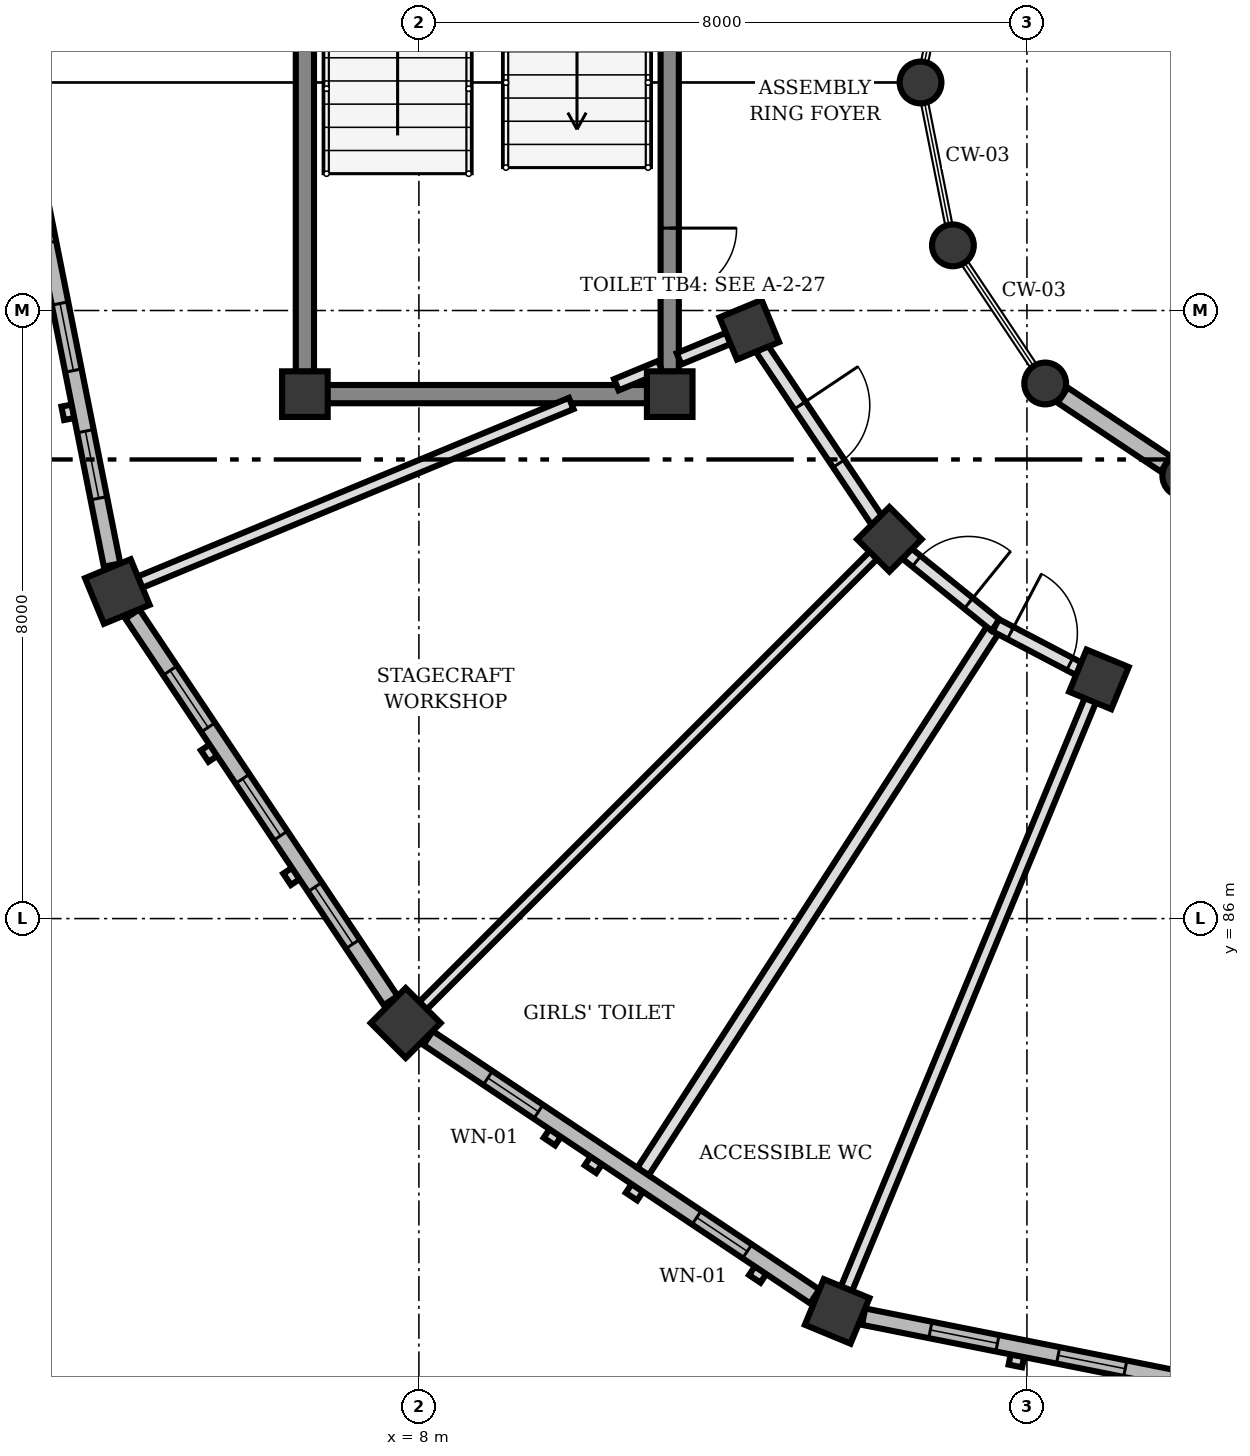
"""IFC4 building model, lengths in metres.
Left out: names, types, materials, properties, quantities, classifications, styles, units other than length and angle.
Written with IfcOpenShell. Run it as: python <this file> out.ifc"""

import sys

from ifc_helpers import new_model, si_unit, direction, frame, frame_2d, origin, origin_2d, place, context, subcontext, project, spatial, rectangle, circle, extrude, element, fill, save


model = new_model("IFC4")
c1 = context("Model", 3, precision=1e-05, world=origin(), true_north=direction((0.0, 1.0)))
c2 = subcontext(c1, "Body", "Model", "MODEL_VIEW")
j1 = project(units=[si_unit("LENGTHUNIT", "METRE"), si_unit("PLANEANGLEUNIT", "RADIAN")], contexts=[c1])
p1 = place(None, origin())
s1 = spatial("IfcSite", under=j1, at=p1, CompositionType="ELEMENT")
p2 = place(p1, origin())
s2 = spatial("IfcBuilding", under=s1, at=p2, CompositionType="ELEMENT")
p3 = place(p2, origin())
s3 = spatial("IfcBuildingStorey", under=s2, at=p3, CompositionType="ELEMENT", Elevation=0.0)
for number, where, z_axis, x_axis in (
    (1, (6.5, 92.9, 0.0), (0.0, 0.0, 1.0), (1.0, 0.0, 0.0)),
    (2, (11.3, 92.9, 0.0), (0.0, 0.0, 1.0), (1.0, 0.0, 0.0)),
):
    element("IfcColumn", number, at=place(p3, frame(where, z_axis=z_axis, x_axis=x_axis)), inside=s3, PredefinedType="COLUMN", context=c2, shape_type="SweptSolid", body=[
        extrude(rectangle(XDim=0.6, YDim=0.6, at=origin_2d()), origin(), (0.0, 0.0, 1.0), 4.5),
    ])
for number, where, z_axis, x_axis in (
    (3, (14.6, 97.0, 0.0), (0.0, 0.0, 1.0), (1.0, 0.0, 0.0)),
    (4, (15.026, 94.857, 0.0), (0.0, 0.0, 1.0), (1.0, 0.0, 0.0)),
    (5, (16.24, 93.04, 0.0), (0.0, 0.0, 1.0), (1.0, 0.0, 0.0)),
    (6, (18.057, 91.826, 0.0), (0.0, 0.0, 1.0), (1.0, 0.0, 0.0)),
):
    element("IfcColumn", number, at=place(p3, frame(where, z_axis=z_axis, x_axis=x_axis)), inside=s3, PredefinedType="COLUMN", context=c2, shape_type="SweptSolid", body=[
        extrude(circle(Radius=0.275, at=origin_2d()), origin(), (0.0, 0.0, 1.0), 4.5),
    ])
for number, where, z_axis, x_axis in (
    (7, (12.347, 93.747, 0.0), (0.0, 0.0, 1.0), (-0.924, -0.383, 0.0)),
    (8, (14.19, 90.99, 0.0), (0.0, 0.0, 1.0), (-0.707, -0.707, 0.0)),
    (9, (16.947, 89.147, 0.0), (0.0, 0.0, 1.0), (-0.383, -0.924, 0.0)),
):
    element("IfcColumn", number, at=place(p3, frame(where, z_axis=z_axis, x_axis=x_axis)), inside=s3, PredefinedType="COLUMN", context=c2, shape_type="SweptSolid", body=[
        extrude(rectangle(XDim=0.6, YDim=0.6, at=origin_2d()), origin(), (0.0, 0.0, 1.0), 4.5),
    ])
for number, where, z_axis, x_axis in (
    (10, (4.032, 90.303, 0.0), (0.0, 0.0, 1.0), (-0.924, -0.383, 0.0)),
    (11, (7.826, 84.626, 0.0), (0.0, 0.0, 1.0), (-0.707, -0.707, 0.0)),
    (12, (13.503, 80.832, 0.0), (0.0, 0.0, 1.0), (-0.383, -0.924, 0.0)),
):
    element("IfcColumn", number, at=place(p3, frame(where, z_axis=z_axis, x_axis=x_axis)), inside=s3, PredefinedType="COLUMN", context=c2, shape_type="SweptSolid", body=[
        extrude(rectangle(XDim=0.65, YDim=0.65, at=origin_2d()), origin(), (0.0, 0.0, 1.0), 4.5),
    ])
p4 = place(p3, frame((2.769, 97.348, 0.0), z_axis=(0.0, 0.0, 1.0), x_axis=(0.195110859746, 0.980781194971, 0.0)))
e13 = element("IfcWall", 13, at=p4, inside=s3, PredefinedType="SOLIDWALL", context=c2, shape_type="SweptSolid", body=[
    extrude(rectangle(XDim=6.119, YDim=0.22, at=frame_2d((3.06, 0.0))), origin(), (0.0, 0.0, 1.0), 3.55),
])
p5 = place(p4, frame((0.896, 0.0, 0.85)))
e14 = element("IfcOpeningElement", 14, at=p5, cuts=e13, PredefinedType="OPENING", context=c2, shape_type="SweptSolid", body=[
    extrude(rectangle(XDim=0.9, YDim=1.4, at=frame_2d((0.45, 0.7))), frame((0.0, 0.12, 0.0), z_axis=(0.0, -1.0, 0.0), x_axis=(1.0, 0.0, 0.0)), (0.0, 0.0, 1.0), 0.24),
])
p6 = place(p4, frame((2.609, 0.0, 0.85)))
e15 = element("IfcOpeningElement", 15, at=p6, cuts=e13, PredefinedType="OPENING", context=c2, shape_type="SweptSolid", body=[
    extrude(rectangle(XDim=0.9, YDim=1.4, at=frame_2d((0.45, 0.7))), frame((0.0, 0.12, 0.0), z_axis=(0.0, -1.0, 0.0), x_axis=(1.0, 0.0, 0.0)), (0.0, 0.0, 1.0), 0.24),
])
p7 = place(p4, frame((4.323, 0.0, 0.85)))
e16 = element("IfcOpeningElement", 16, at=p7, cuts=e13, PredefinedType="OPENING", context=c2, shape_type="SweptSolid", body=[
    extrude(rectangle(XDim=0.9, YDim=1.4, at=frame_2d((0.45, 0.7))), frame((0.0, 0.12, 0.0), z_axis=(0.0, -1.0, 0.0), x_axis=(1.0, 0.0, 0.0)), (0.0, 0.0, 1.0), 0.24),
])
p8 = place(p3, frame((3.963, 90.651, 0.0), z_axis=(0.0, 0.0, 1.0), x_axis=(-0.195110859746, 0.980781194971, 0.0)))
e17 = element("IfcWall", 17, at=p8, inside=s3, PredefinedType="SOLIDWALL", context=c2, shape_type="SweptSolid", body=[
    extrude(rectangle(XDim=6.119, YDim=0.22, at=frame_2d((3.06, 0.0))), origin(), (0.0, 0.0, 1.0), 3.55),
])
p9 = place(p8, frame((0.896, 0.0, 0.85)))
e18 = element("IfcOpeningElement", 18, at=p9, cuts=e17, PredefinedType="OPENING", context=c2, shape_type="SweptSolid", body=[
    extrude(rectangle(XDim=0.9, YDim=1.4, at=frame_2d((0.45, 0.7))), frame((0.0, 0.12, 0.0), z_axis=(0.0, -1.0, 0.0), x_axis=(1.0, 0.0, 0.0)), (0.0, 0.0, 1.0), 0.24),
])
p10 = place(p8, frame((2.609, 0.0, 0.85)))
e19 = element("IfcOpeningElement", 19, at=p10, cuts=e17, PredefinedType="OPENING", context=c2, shape_type="SweptSolid", body=[
    extrude(rectangle(XDim=0.9, YDim=1.4, at=frame_2d((0.45, 0.7))), frame((0.0, 0.12, 0.0), z_axis=(0.0, -1.0, 0.0), x_axis=(1.0, 0.0, 0.0)), (0.0, 0.0, 1.0), 0.24),
])
p11 = place(p8, frame((4.323, 0.0, 0.85)))
e20 = element("IfcOpeningElement", 20, at=p11, cuts=e17, PredefinedType="OPENING", context=c2, shape_type="SweptSolid", body=[
    extrude(rectangle(XDim=0.9, YDim=1.4, at=frame_2d((0.45, 0.7))), frame((0.0, 0.12, 0.0), z_axis=(0.0, -1.0, 0.0), x_axis=(1.0, 0.0, 0.0)), (0.0, 0.0, 1.0), 0.24),
])
p12 = place(p3, frame((7.629, 84.921, 0.0), z_axis=(0.0, 0.0, 1.0), x_axis=(-0.555657446161, 0.831411331728, 0.0)))
e21 = element("IfcWall", 21, at=p12, inside=s3, PredefinedType="SOLIDWALL", context=c2, shape_type="SweptSolid", body=[
    extrude(rectangle(XDim=6.119, YDim=0.22, at=frame_2d((3.059, 0.0))), origin(), (0.0, 0.0, 1.0), 3.55),
])
p13 = place(p12, frame((0.896, 0.0, 0.85)))
e22 = element("IfcOpeningElement", 22, at=p13, cuts=e21, PredefinedType="OPENING", context=c2, shape_type="SweptSolid", body=[
    extrude(rectangle(XDim=0.9, YDim=1.4, at=frame_2d((0.45, 0.7))), frame((0.0, 0.12, 0.0), z_axis=(0.0, -1.0, 0.0), x_axis=(1.0, 0.0, 0.0)), (0.0, 0.0, 1.0), 0.24),
])
p14 = place(p12, frame((2.609, 0.0, 0.85)))
e23 = element("IfcOpeningElement", 23, at=p14, cuts=e21, PredefinedType="OPENING", context=c2, shape_type="SweptSolid", body=[
    extrude(rectangle(XDim=0.9, YDim=1.4, at=frame_2d((0.45, 0.7))), frame((0.0, 0.12, 0.0), z_axis=(0.0, -1.0, 0.0), x_axis=(1.0, 0.0, 0.0)), (0.0, 0.0, 1.0), 0.24),
])
p15 = place(p12, frame((4.323, 0.0, 0.85)))
e24 = element("IfcOpeningElement", 24, at=p15, cuts=e21, PredefinedType="OPENING", context=c2, shape_type="SweptSolid", body=[
    extrude(rectangle(XDim=0.9, YDim=1.4, at=frame_2d((0.45, 0.7))), frame((0.0, 0.12, 0.0), z_axis=(0.0, -1.0, 0.0), x_axis=(1.0, 0.0, 0.0)), (0.0, 0.0, 1.0), 0.24),
])
p16 = place(p3, frame((13.208, 81.029, 0.0), z_axis=(0.0, 0.0, 1.0), x_axis=(-0.83139901156, 0.555675879967, 0.0)))
e25 = element("IfcWall", 25, at=p16, inside=s3, PredefinedType="SOLIDWALL", context=c2, shape_type="SweptSolid", body=[
    extrude(rectangle(XDim=6.118, YDim=0.22, at=frame_2d((3.059, 0.0))), origin(), (0.0, 0.0, 1.0), 3.55),
])
p17 = place(p16, frame((1.068, 0.0, 1.15)))
e26 = element("IfcOpeningElement", 26, at=p17, cuts=e25, PredefinedType="OPENING", context=c2, shape_type="SweptSolid", body=[
    extrude(rectangle(XDim=0.8, YDim=1.1, at=frame_2d((0.4, 0.55))), frame((0.0, 0.12, 0.0), z_axis=(0.0, -1.0, 0.0), x_axis=(1.0, 0.0, 0.0)), (0.0, 0.0, 1.0), 0.24),
])
p18 = place(p16, frame((4.373, 0.0, 1.15)))
e27 = element("IfcOpeningElement", 27, at=p18, cuts=e25, PredefinedType="OPENING", context=c2, shape_type="SweptSolid", body=[
    extrude(rectangle(XDim=0.8, YDim=1.1, at=frame_2d((0.4, 0.55))), frame((0.0, 0.12, 0.0), z_axis=(0.0, -1.0, 0.0), x_axis=(1.0, 0.0, 0.0)), (0.0, 0.0, 1.0), 0.24),
])
p19 = place(p3, frame((16.47, 92.886, 0.0), z_axis=(0.0, 0.0, 1.0), x_axis=(0.83165874011, -0.555287078904, 0.0)))
e28 = element("IfcWall", 28, at=p19, inside=s3, PredefinedType="SOLIDWALL", context=c2, shape_type="SweptSolid", body=[
    extrude(rectangle(XDim=1.632, YDim=0.24, at=frame_2d((0.816, 0.0))), origin(), (0.0, 0.0, 1.0), 3.55),
])
p20 = place(p3, frame((19.852, 79.569, 0.0), z_axis=(0.0, 0.0, 1.0), x_axis=(-0.98077967596, 0.19511849534, 0.0)))
e29 = element("IfcWall", 29, at=p20, inside=s3, PredefinedType="SOLIDWALL", context=c2, shape_type="SweptSolid", body=[
    extrude(rectangle(XDim=6.119, YDim=0.22, at=frame_2d((3.059, 0.0))), origin(), (0.0, 0.0, 1.0), 3.55),
])
p21 = place(p20, frame((0.896, 0.0, 0.85)))
e30 = element("IfcOpeningElement", 30, at=p21, cuts=e29, PredefinedType="OPENING", context=c2, shape_type="SweptSolid", body=[
    extrude(rectangle(XDim=0.9, YDim=1.4, at=frame_2d((0.45, 0.7))), frame((0.0, 0.12, 0.0), z_axis=(0.0, -1.0, 0.0), x_axis=(1.0, 0.0, 0.0)), (0.0, 0.0, 1.0), 0.24),
])
p22 = place(p20, frame((2.609, 0.0, 0.85)))
e31 = element("IfcOpeningElement", 31, at=p22, cuts=e29, PredefinedType="OPENING", context=c2, shape_type="SweptSolid", body=[
    extrude(rectangle(XDim=0.9, YDim=1.4, at=frame_2d((0.45, 0.7))), frame((0.0, 0.12, 0.0), z_axis=(0.0, -1.0, 0.0), x_axis=(1.0, 0.0, 0.0)), (0.0, 0.0, 1.0), 0.24),
])
p23 = place(p20, frame((4.323, 0.0, 0.85)))
e32 = element("IfcOpeningElement", 32, at=p23, cuts=e29, PredefinedType="OPENING", context=c2, shape_type="SweptSolid", body=[
    extrude(rectangle(XDim=0.9, YDim=1.4, at=frame_2d((0.45, 0.7))), frame((0.0, 0.12, 0.0), z_axis=(0.0, -1.0, 0.0), x_axis=(1.0, 0.0, 0.0)), (0.0, 0.0, 1.0), 0.24),
])
p24 = place(p3, frame((6.5, 93.192, 0.0), z_axis=(0.0, 0.0, 1.0), x_axis=(0.0, 1.0, 0.0)))
e33 = element("IfcWall", 33, at=p24, inside=s3, PredefinedType="SHEAR", context=c2, shape_type="SweptSolid", body=[
    extrude(rectangle(XDim=8.136, YDim=0.24, at=frame_2d((4.068, 0.0))), origin(), (0.0, 0.0, 1.0), 4.24),
])
p25 = place(p3, frame((11.3, 101.328, 0.0), z_axis=(0.0, 0.0, 1.0), x_axis=(0.0, -1.0, 0.0)))
e34 = element("IfcWall", 34, at=p25, inside=s3, PredefinedType="SHEAR", context=c2, shape_type="SweptSolid", body=[
    extrude(rectangle(XDim=8.136, YDim=0.24, at=frame_2d((4.068, 0.0))), origin(), (0.0, 0.0, 1.0), 4.24),
])
p26 = place(p25, frame((6.244, 0.0, 0.0)))
e35 = element("IfcOpeningElement", 35, at=p26, cuts=e34, PredefinedType="OPENING", context=c2, shape_type="SweptSolid", body=[
    extrude(rectangle(XDim=0.88, YDim=2.1, at=frame_2d((0.44, 1.05))), frame((0.0, 0.13, 0.0), z_axis=(0.0, -1.0, 0.0), x_axis=(1.0, 0.0, 0.0)), (0.0, 0.0, 1.0), 0.26),
])
p27 = place(p3, frame((11.008, 92.9, 0.0), z_axis=(0.0, 0.0, 1.0), x_axis=(-1.0, 0.0, 0.0)))
e36 = element("IfcWall", 36, at=p27, inside=s3, PredefinedType="SHEAR", context=c2, shape_type="SweptSolid", body=[
    extrude(rectangle(XDim=4.216, YDim=0.24, at=frame_2d((2.108, 0.0))), origin(), (0.0, 0.0, 1.0), 4.24),
])
p28 = place(p3, frame((12.077, 93.636, 0.0), z_axis=(0.0, 0.0, 1.0), x_axis=(-0.923789734747, -0.382900151445, 0.0)))
e37 = element("IfcWall", 37, at=p28, inside=s3, PredefinedType="PARTITIONING", context=c2, shape_type="SweptSolid", body=[
    extrude(rectangle(XDim=0.708, YDim=0.16, at=frame_2d((0.354, 0.0))), origin(), (0.0, 0.0, 1.0), 3.552),
])
p29 = place(p3, frame((11.177, 93.263, 0.0), z_axis=(0.0, 0.0, 1.0), x_axis=(-0.923812676193, -0.382844797933, 0.0)))
e38 = element("IfcWall", 38, at=p29, inside=s3, PredefinedType="PARTITIONING", context=c2, shape_type="SweptSolid", body=[
    extrude(rectangle(XDim=0.627, YDim=0.16, at=frame_2d((0.313, 0.0))), origin(), (0.0, 0.0, 1.0), 3.552),
])
p30 = place(p3, frame((10.004, 92.777, 0.0), z_axis=(0.0, 0.0, 1.0), x_axis=(-0.923837705987, -0.382784394923, 0.0)))
e39 = element("IfcWall", 39, at=p30, inside=s3, PredefinedType="PARTITIONING", context=c2, shape_type="SweptSolid", body=[
    extrude(rectangle(XDim=6.147, YDim=0.16, at=frame_2d((3.074, 0.0))), origin(), (0.0, 0.0, 1.0), 3.552),
])
p31 = place(p3, frame((13.984, 90.784, 0.0), z_axis=(0.0, 0.0, 1.0), x_axis=(-0.707106781187, -0.707106781187, 0.0)))
e40 = element("IfcWall", 40, at=p31, inside=s3, PredefinedType="PARTITIONING", context=c2, shape_type="SweptSolid", body=[
    extrude(rectangle(XDim=8.392, YDim=0.14, at=frame_2d((4.196, 0.0))), origin(), (0.0, 0.0, 1.0), 3.552),
])
p32 = place(p3, frame((16.836, 88.877, 0.0), z_axis=(0.0, 0.0, 1.0), x_axis=(-0.382780060664, -0.923839501839, 0.0)))
e41 = element("IfcWall", 41, at=p32, inside=s3, PredefinedType="PARTITIONING", context=c2, shape_type="SweptSolid", body=[
    extrude(rectangle(XDim=8.391, YDim=0.16, at=frame_2d((4.196, 0.0))), origin(), (0.0, 0.0, 1.0), 3.552),
])
p33 = place(p3, frame((15.589, 89.859, 0.0), z_axis=(0.0, 0.0, 1.0), x_axis=(-0.542440235144, -0.840094394278, 0.0)))
e42 = element("IfcWall", 42, at=p33, inside=s3, PredefinedType="PARTITIONING", context=c2, shape_type="SweptSolid", body=[
    extrude(rectangle(XDim=8.552, YDim=0.18, at=frame_2d((4.276, 0.0))), origin(), (0.0, 0.0, 1.0), 3.552),
])
p34 = place(p3, frame((12.512, 93.499, 0.0), z_axis=(0.0, 0.0, 1.0), x_axis=(0.556128339679, -0.831096426298, 0.0)))
e43 = element("IfcWall", 43, at=p34, inside=s3, PredefinedType="PARTITIONING", context=c2, shape_type="SweptSolid", body=[
    extrude(rectangle(XDim=2.72, YDim=0.18, at=frame_2d((1.36, 0.0))), origin(), (0.0, 0.0, 1.0), 3.552),
])
p35 = place(p34, frame((0.9, 0.0, 0.0)))
e44 = element("IfcOpeningElement", 44, at=p35, cuts=e43, PredefinedType="OPENING", context=c2, shape_type="SweptSolid", body=[
    extrude(rectangle(XDim=0.92, YDim=2.1, at=frame_2d((0.46, 1.05))), frame((0.0, 0.1, 0.0), z_axis=(0.0, -1.0, 0.0), x_axis=(1.0, 0.0, 0.0)), (0.0, 0.0, 1.0), 0.2),
])
p36 = place(p3, frame((14.418, 90.805, 0.0), z_axis=(0.0, 0.0, 1.0), x_axis=(0.777901544977, -0.628386176107, 0.0)))
e45 = element("IfcWall", 45, at=p36, inside=s3, PredefinedType="PARTITIONING", context=c2, shape_type="SweptSolid", body=[
    extrude(rectangle(XDim=1.506, YDim=0.18, at=frame_2d((0.753, 0.0))), origin(), (0.0, 0.0, 1.0), 3.552),
])
p37 = place(p36, frame((0.166, 0.0, 0.0)))
e46 = element("IfcOpeningElement", 46, at=p37, cuts=e45, PredefinedType="OPENING", context=c2, shape_type="SweptSolid", body=[
    extrude(rectangle(XDim=0.88, YDim=2.1, at=frame_2d((0.44, 1.05))), frame((0.0, 0.1, 0.0), z_axis=(0.0, -1.0, 0.0), x_axis=(1.0, 0.0, 0.0)), (0.0, 0.0, 1.0), 0.2),
])
p38 = place(p3, frame((15.589, 89.859, 0.0), z_axis=(0.0, 0.0, 1.0), x_axis=(0.885553865366, -0.464536706337, 0.0)))
e47 = element("IfcWall", 47, at=p38, inside=s3, PredefinedType="PARTITIONING", context=c2, shape_type="SweptSolid", body=[
    extrude(rectangle(XDim=1.24, YDim=0.18, at=frame_2d((0.62, 0.0))), origin(), (0.0, 0.0, 1.0), 3.552),
])
p39 = place(p38, frame((0.22, 0.0, 0.0)))
e48 = element("IfcOpeningElement", 48, at=p39, cuts=e47, PredefinedType="OPENING", context=c2, shape_type="SweptSolid", body=[
    extrude(rectangle(XDim=0.88, YDim=2.1, at=frame_2d((0.44, 1.05))), frame((0.0, 0.1, 0.0), z_axis=(0.0, -1.0, 0.0), x_axis=(1.0, 0.0, 0.0)), (0.0, 0.0, 1.0), 0.2),
])
p40 = place(p9, origin())
e49 = element("IfcWindow", 49, at=p40, inside=s3, PartitioningType="SINGLE_PANEL", PredefinedType="WINDOW", context=c2, shape_type="SweptSolid", body=[
    extrude(rectangle(XDim=0.9, YDim=1.4, at=frame_2d((0.45, 0.7))), frame((0.0, 0.03, 0.0), z_axis=(0.0, -1.0, 0.0), x_axis=(1.0, 0.0, 0.0)), (0.0, 0.0, 1.0), 0.06),
])
fill(e18, e49)
p41 = place(p10, origin())
e50 = element("IfcWindow", 50, at=p41, inside=s3, PartitioningType="SINGLE_PANEL", PredefinedType="WINDOW", context=c2, shape_type="SweptSolid", body=[
    extrude(rectangle(XDim=0.9, YDim=1.4, at=frame_2d((0.45, 0.7))), frame((0.0, 0.03, 0.0), z_axis=(0.0, -1.0, 0.0), x_axis=(1.0, 0.0, 0.0)), (0.0, 0.0, 1.0), 0.06),
])
fill(e19, e50)
p42 = place(p13, origin())
e51 = element("IfcWindow", 51, at=p42, inside=s3, PartitioningType="SINGLE_PANEL", PredefinedType="WINDOW", context=c2, shape_type="SweptSolid", body=[
    extrude(rectangle(XDim=0.9, YDim=1.4, at=frame_2d((0.45, 0.7))), frame((0.0, 0.03, 0.0), z_axis=(0.0, -1.0, 0.0), x_axis=(1.0, 0.0, 0.0)), (0.0, 0.0, 1.0), 0.06),
])
fill(e22, e51)
p43 = place(p14, origin())
e52 = element("IfcWindow", 52, at=p43, inside=s3, PartitioningType="SINGLE_PANEL", PredefinedType="WINDOW", context=c2, shape_type="SweptSolid", body=[
    extrude(rectangle(XDim=0.9, YDim=1.4, at=frame_2d((0.45, 0.7))), frame((0.0, 0.03, 0.0), z_axis=(0.0, -1.0, 0.0), x_axis=(1.0, 0.0, 0.0)), (0.0, 0.0, 1.0), 0.06),
])
fill(e23, e52)
p44 = place(p15, origin())
e53 = element("IfcWindow", 53, at=p44, inside=s3, PartitioningType="SINGLE_PANEL", PredefinedType="WINDOW", context=c2, shape_type="SweptSolid", body=[
    extrude(rectangle(XDim=0.9, YDim=1.4, at=frame_2d((0.45, 0.7))), frame((0.0, 0.03, 0.0), z_axis=(0.0, -1.0, 0.0), x_axis=(1.0, 0.0, 0.0)), (0.0, 0.0, 1.0), 0.06),
])
fill(e24, e53)
p45 = place(p17, origin())
e54 = element("IfcWindow", 54, at=p45, inside=s3, PartitioningType="SINGLE_PANEL", PredefinedType="WINDOW", context=c2, shape_type="SweptSolid", body=[
    extrude(rectangle(XDim=0.8, YDim=1.1, at=frame_2d((0.4, 0.55))), frame((0.0, 0.03, 0.0), z_axis=(0.0, -1.0, 0.0), x_axis=(1.0, 0.0, 0.0)), (0.0, 0.0, 1.0), 0.06),
])
fill(e26, e54)
p46 = place(p18, origin())
e55 = element("IfcWindow", 55, at=p46, inside=s3, PartitioningType="SINGLE_PANEL", PredefinedType="WINDOW", context=c2, shape_type="SweptSolid", body=[
    extrude(rectangle(XDim=0.8, YDim=1.1, at=frame_2d((0.4, 0.55))), frame((0.0, 0.03, 0.0), z_axis=(0.0, -1.0, 0.0), x_axis=(1.0, 0.0, 0.0)), (0.0, 0.0, 1.0), 0.06),
])
fill(e27, e55)
p47 = place(p22, origin())
e56 = element("IfcWindow", 56, at=p47, inside=s3, PartitioningType="SINGLE_PANEL", PredefinedType="WINDOW", context=c2, shape_type="SweptSolid", body=[
    extrude(rectangle(XDim=0.9, YDim=1.4, at=frame_2d((0.45, 0.7))), frame((0.0, 0.03, 0.0), z_axis=(0.0, -1.0, 0.0), x_axis=(1.0, 0.0, 0.0)), (0.0, 0.0, 1.0), 0.06),
])
fill(e31, e56)
p48 = place(p23, origin())
e57 = element("IfcWindow", 57, at=p48, inside=s3, PartitioningType="SINGLE_PANEL", PredefinedType="WINDOW", context=c2, shape_type="SweptSolid", body=[
    extrude(rectangle(XDim=0.9, YDim=1.4, at=frame_2d((0.45, 0.7))), frame((0.0, 0.03, 0.0), z_axis=(0.0, -1.0, 0.0), x_axis=(1.0, 0.0, 0.0)), (0.0, 0.0, 1.0), 0.06),
])
fill(e32, e57)
p49 = place(p26, origin())
e58 = element("IfcDoor", 58, at=p49, inside=s3, OperationType="SINGLE_SWING_LEFT", PredefinedType="DOOR", context=c2, shape_type="SweptSolid", body=[
    extrude(rectangle(XDim=0.88, YDim=2.1, at=frame_2d((0.44, 1.05))), frame((0.0, 0.025, 0.0), z_axis=(0.0, -1.0, 0.0), x_axis=(1.0, 0.0, 0.0)), (0.0, 0.0, 1.0), 0.05),
])
fill(e35, e58)
p50 = place(p35, origin())
e59 = element("IfcDoor", 59, at=p50, inside=s3, OperationType="SINGLE_SWING_LEFT", PredefinedType="DOOR", context=c2, shape_type="SweptSolid", body=[
    extrude(rectangle(XDim=0.92, YDim=2.1, at=frame_2d((0.46, 1.05))), frame((0.0, 0.025, 0.0), z_axis=(0.0, -1.0, 0.0), x_axis=(1.0, 0.0, 0.0)), (0.0, 0.0, 1.0), 0.05),
])
fill(e44, e59)
p51 = place(p37, origin())
e60 = element("IfcDoor", 60, at=p51, inside=s3, OperationType="SINGLE_SWING_RIGHT", PredefinedType="DOOR", context=c2, shape_type="SweptSolid", body=[
    extrude(rectangle(XDim=0.88, YDim=2.1, at=frame_2d((0.44, 1.05))), frame((0.0, 0.025, 0.0), z_axis=(0.0, -1.0, 0.0), x_axis=(1.0, 0.0, 0.0)), (0.0, 0.0, 1.0), 0.05),
])
fill(e46, e60)
p52 = place(p39, origin())
e61 = element("IfcDoor", 61, at=p52, inside=s3, OperationType="SINGLE_SWING_LEFT", PredefinedType="DOOR", context=c2, shape_type="SweptSolid", body=[
    extrude(rectangle(XDim=0.88, YDim=2.1, at=frame_2d((0.44, 1.05))), frame((0.0, 0.025, 0.0), z_axis=(0.0, -1.0, 0.0), x_axis=(1.0, 0.0, 0.0)), (0.0, 0.0, 1.0), 0.05),
])
fill(e48, e61)
save(model, sys.argv[1])
